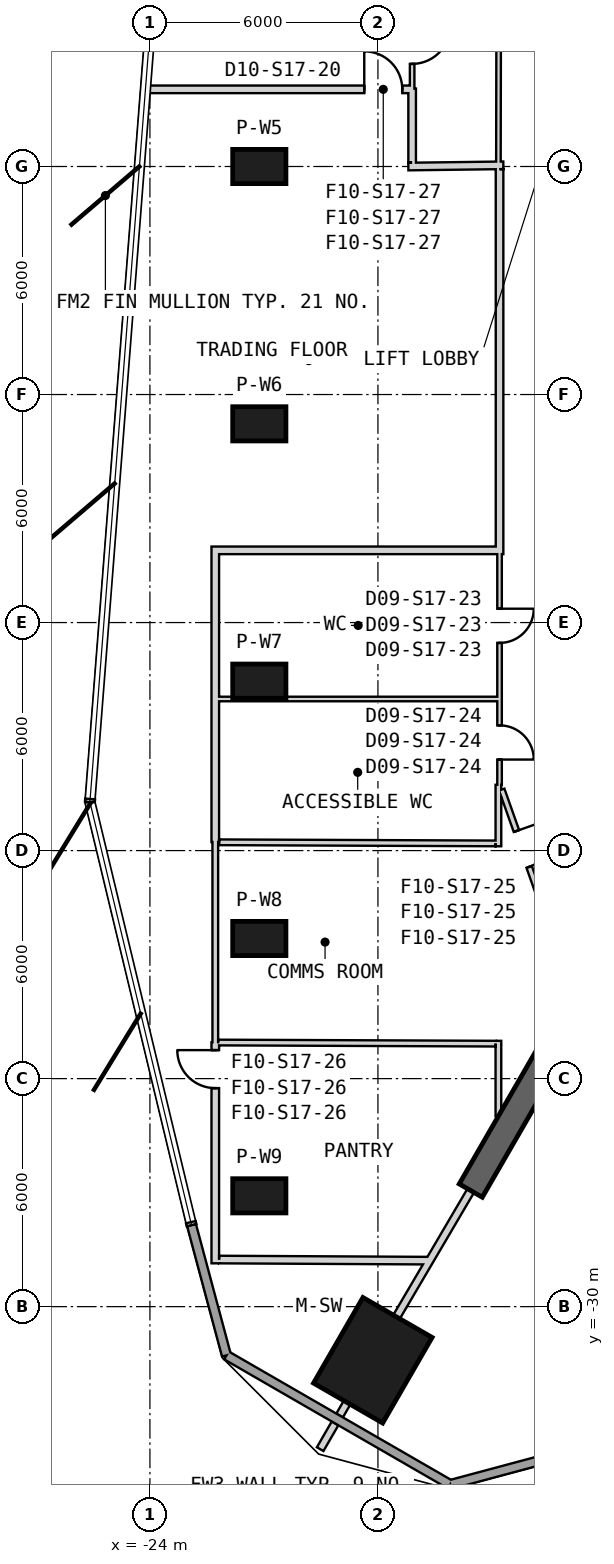
"""IFC4 building model, lengths in metres.
Left out: names, types, materials, properties, quantities, classifications, styles, units other than length and angle.
Written with IfcOpenShell. Run it as: python <this file> out.ifc"""

import sys

from ifc_helpers import new_model, si_unit, direction, frame, frame_2d, origin, origin_2d, place, context, subcontext, project, spatial, rectangle, extrude, element, fill, save


model = new_model("IFC4")
c1 = context("Model", 3, precision=1e-05, world=origin(), true_north=direction((0.0, 1.0)))
c2 = subcontext(c1, "Body", "Model", "MODEL_VIEW")
j1 = project(units=[si_unit("LENGTHUNIT", "METRE"), si_unit("PLANEANGLEUNIT", "RADIAN")], contexts=[c1])
p1 = place(None, origin())
s1 = spatial("IfcSite", under=j1, at=p1, CompositionType="ELEMENT")
p2 = place(p1, origin())
s2 = spatial("IfcBuilding", under=s1, at=p2, CompositionType="ELEMENT")
p3 = place(p2, frame((0.0, 0.0, 265.2)))
s3 = spatial("IfcBuildingStorey", under=s2, at=p3, CompositionType="ELEMENT", Elevation=265.2)
p4 = place(p3, frame((-18.135, -31.411, 0.0), z_axis=(0.0, 0.0, 1.0), x_axis=(-0.5, -0.866025403784, 0.0)))
e1 = element("IfcColumn", 1, at=p4, inside=s3, PredefinedType="COLUMN", context=c2, shape_type="SweptSolid", body=[
    extrude(rectangle(XDim=2.6, YDim=2.1, at=origin_2d()), origin(), (0.0, 0.0, 1.0), 4.0),
])
for number, where, z_axis, x_axis in (
    (2, (-21.121, 0.0, 0.0), (0.0, 0.0, 1.0), (-1.0, 0.0, 0.0)),
    (3, (-21.121, -6.771, 0.0), (0.0, 0.0, 1.0), (-1.0, 0.0, 0.0)),
    (4, (-21.121, -13.542, 0.0), (0.0, 0.0, 1.0), (-1.0, 0.0, 0.0)),
    (5, (-21.121, -20.313, 0.0), (0.0, 0.0, 1.0), (-1.0, 0.0, 0.0)),
    (6, (-21.121, -27.084, 0.0), (0.0, 0.0, 1.0), (-1.0, 0.0, 0.0)),
):
    element("IfcColumn", number, at=place(p3, frame(where, z_axis=z_axis, x_axis=x_axis)), inside=s3, PredefinedType="COLUMN", context=c2, shape_type="SweptSolid", body=[
        extrude(rectangle(XDim=1.4, YDim=0.9, at=origin_2d()), origin(), (0.0, 0.0, 1.0), 4.0),
    ])
p5 = place(p3, frame((-10.575, -18.316, 0.0), z_axis=(0.0, 0.0, 1.0), x_axis=(-0.500007350791, -0.866021159762, 0.0)))
e7 = element("IfcWall", 7, at=p5, inside=s3, PredefinedType="SHEAR", context=c2, shape_type="SweptSolid", body=[
    extrude(rectangle(XDim=9.965, YDim=0.7, at=frame_2d((4.982, 0.0))), origin(), (0.0, 0.0, 1.0), 4.0),
])
p6 = place(p3, frame((-22.905, -27.854, 0.0), z_axis=(0.0, 0.0, 1.0), x_axis=(0.258814010312, -0.965927175343, 0.0)))
e8 = element("IfcWall", 8, at=p6, inside=s3, PredefinedType="SOLIDWALL", context=c2, shape_type="SweptSolid", body=[
    extrude(rectangle(XDim=3.55, YDim=0.24, at=frame_2d((1.775, 0.0))), origin(), (0.0, 0.0, 1.0), 3.7),
])
p7 = place(p3, frame((-21.986, -31.283, 0.0), z_axis=(0.0, 0.0, 1.0), x_axis=(0.866022320763, -0.500005339912, 0.0)))
e9 = element("IfcWall", 9, at=p7, inside=s3, PredefinedType="SOLIDWALL", context=c2, shape_type="SweptSolid", body=[
    extrude(rectangle(XDim=6.798, YDim=0.24, at=frame_2d((3.399, 0.0))), origin(), (0.0, 0.0, 1.0), 3.7),
])
p8 = place(p3, frame((-16.099, -34.682, 0.0), z_axis=(0.0, 0.0, 1.0), x_axis=(0.965919080444, 0.258844219627, 0.0)))
e10 = element("IfcWall", 10, at=p8, inside=s3, PredefinedType="SOLIDWALL", context=c2, shape_type="SweptSolid", body=[
    extrude(rectangle(XDim=3.536, YDim=0.24, at=frame_2d((1.768, 0.0))), origin(), (0.0, 0.0, 1.0), 3.7),
])
p9 = place(p3, frame((-14.8, 16.257, 0.0), z_axis=(0.0, 0.0, 1.0), x_axis=(-0.001847148781, -0.999998294019, 0.0)))
e11 = element("IfcWall", 11, at=p9, inside=s3, PredefinedType="PARTITIONING", context=c2, shape_type="SweptSolid", body=[
    extrude(rectangle(XDim=16.257, YDim=0.12, at=frame_2d((8.128, 0.0))), origin(), (0.0, 0.0, 1.0), 2.98),
])
p10 = place(p9, frame((7.629, 0.0, 0.0)))
e12 = element("IfcOpeningElement", 12, at=p10, cuts=e11, PredefinedType="OPENING", context=c2, shape_type="SweptSolid", body=[
    extrude(rectangle(XDim=1.0, YDim=2.1, at=frame_2d((0.5, 1.05))), frame((0.0, 0.07, 0.0), z_axis=(0.0, -1.0, 0.0), x_axis=(1.0, 0.0, 0.0)), (0.0, 0.0, 1.0), 0.14),
])
p11 = place(p3, frame((-14.8, -10.13, 0.0), z_axis=(0.0, 0.0, 1.0), x_axis=(0.0, -1.0, 0.0)))
e13 = element("IfcWall", 13, at=p11, inside=s3, PredefinedType="PARTITIONING", context=c2, shape_type="SweptSolid", body=[
    extrude(rectangle(XDim=6.138, YDim=0.12, at=frame_2d((3.069, 0.0))), origin(), (0.0, 0.0, 1.0), 2.98),
])
p12 = place(p11, frame((1.506, 0.0, 0.0)))
e14 = element("IfcOpeningElement", 14, at=p12, cuts=e13, PredefinedType="OPENING", context=c2, shape_type="SweptSolid", body=[
    extrude(rectangle(XDim=0.9, YDim=2.1, at=frame_2d((0.45, 1.05))), frame((0.0, 0.07, 0.0), z_axis=(0.0, -1.0, 0.0), x_axis=(1.0, 0.0, 0.0)), (0.0, 0.0, 1.0), 0.14),
])
p13 = place(p11, frame((4.575, 0.0, 0.0)))
e15 = element("IfcOpeningElement", 15, at=p13, cuts=e13, PredefinedType="OPENING", context=c2, shape_type="SweptSolid", body=[
    extrude(rectangle(XDim=0.9, YDim=2.1, at=frame_2d((0.45, 1.05))), frame((0.0, 0.07, 0.0), z_axis=(0.0, -1.0, 0.0), x_axis=(1.0, 0.0, 0.0)), (0.0, 0.0, 1.0), 0.14),
])
p14 = place(p3, frame((-17.1, 4.35, 0.0), z_axis=(0.0, 0.0, 1.0), x_axis=(0.0, -1.0, 0.0)))
e16 = element("IfcWall", 16, at=p14, inside=s3, PredefinedType="PARTITIONING", context=c2, shape_type="SweptSolid", body=[
    extrude(rectangle(XDim=2.3, YDim=0.12, at=frame_2d((1.15, 0.0))), origin(), (0.0, 0.0, 1.0), 3.7),
])
p15 = place(p14, frame((0.65, 0.0, 0.0)))
e17 = element("IfcOpeningElement", 17, at=p15, cuts=e16, PredefinedType="OPENING", context=c2, shape_type="SweptSolid", body=[
    extrude(rectangle(XDim=1.0, YDim=2.1, at=frame_2d((0.5, 1.05))), frame((0.0, 0.07, 0.0), z_axis=(0.0, -1.0, 0.0), x_axis=(1.0, 0.0, 0.0)), (0.0, 0.0, 1.0), 0.14),
])
p16 = place(p3, frame((-17.2, -0.001, 0.0), z_axis=(0.0, 0.0, 1.0), x_axis=(0.999915662945, 0.012987185857, 0.0)))
e18 = element("IfcWall", 18, at=p16, inside=s3, PredefinedType="PARTITIONING", context=c2, shape_type="SweptSolid", body=[
    extrude(rectangle(XDim=2.5, YDim=0.2, at=frame_2d((1.25, 0.0))), origin(), (0.0, 0.0, 1.0), 3.07),
])
p17 = place(p3, frame((-17.1, 2.05, 0.0), z_axis=(0.0, 0.0, 1.0), x_axis=(0.0, -1.0, 0.0)))
e19 = element("IfcWall", 19, at=p17, inside=s3, PredefinedType="PARTITIONING", context=c2, shape_type="SweptSolid", body=[
    extrude(rectangle(XDim=1.95, YDim=0.2, at=frame_2d((0.975, 0.0))), origin(), (0.0, 0.0, 1.0), 3.07),
])
p18 = place(p3, frame((-14.8, -0.07, 0.0), z_axis=(0.0, 0.0, 1.0), x_axis=(0.0, -1.0, 0.0)))
e20 = element("IfcWall", 20, at=p18, inside=s3, PredefinedType="PARTITIONING", context=c2, shape_type="SweptSolid", body=[
    extrude(rectangle(XDim=10.13, YDim=0.2, at=frame_2d((5.065, 0.0))), origin(), (0.0, 0.0, 1.0), 3.07),
])
p19 = place(p3, frame((-14.743, -16.394, 0.0), z_axis=(0.0, 0.0, 1.0), x_axis=(0.334298080075, -0.942467396602, 0.0)))
e21 = element("IfcWall", 21, at=p19, inside=s3, PredefinedType="PLUMBINGWALL", context=c2, shape_type="SweptSolid", body=[
    extrude(rectangle(XDim=3.317, YDim=0.15, at=frame_2d((1.659, 0.0))), origin(), (0.0, 0.0, 1.0), 2.88),
])
p20 = place(p19, frame((1.158, 0.0, 0.0)))
e22 = element("IfcOpeningElement", 22, at=p20, cuts=e21, PredefinedType="OPENING", context=c2, shape_type="SweptSolid", body=[
    extrude(rectangle(XDim=1.0, YDim=2.1, at=frame_2d((0.5, 1.05))), frame((0.0, 0.085, 0.0), z_axis=(0.0, -1.0, 0.0), x_axis=(1.0, 0.0, 0.0)), (0.0, 0.0, 1.0), 0.17),
])
p21 = place(p3, frame((-24.118, 2.03, 0.0), z_axis=(0.0, 0.0, 1.0), x_axis=(1.0, 0.0, 0.0)))
e23 = element("IfcWall", 23, at=p21, inside=s3, PredefinedType="PARTITIONING", context=c2, shape_type="SweptSolid", body=[
    extrude(rectangle(XDim=6.958, YDim=0.2, at=frame_2d((3.479, 0.0))), origin(), (0.0, 0.0, 1.0), 3.7),
])
p22 = place(p21, frame((5.758, 0.0, 0.0)))
e24 = element("IfcOpeningElement", 24, at=p22, cuts=e23, PredefinedType="OPENING", context=c2, shape_type="SweptSolid", body=[
    extrude(rectangle(XDim=1.0, YDim=2.1, at=frame_2d((0.5, 1.05))), frame((0.0, 0.11, 0.0), z_axis=(0.0, -1.0, 0.0), x_axis=(1.0, 0.0, 0.0)), (0.0, 0.0, 1.0), 0.22),
])
p23 = place(p3, frame((-15.557, -26.946, 0.0), z_axis=(0.0, 0.0, 1.0), x_axis=(-0.506699088554, -0.862122980588, 0.0)))
e25 = element("IfcWall", 25, at=p23, inside=s3, PredefinedType="PARTITIONING", context=c2, shape_type="SweptSolid", body=[
    extrude(rectangle(XDim=3.855, YDim=0.2, at=frame_2d((1.928, 0.0))), origin(), (0.0, 0.0, 1.0), 3.27),
])
p24 = place(p3, frame((-18.811, -32.522, 0.0), z_axis=(0.0, 0.0, 1.0), x_axis=(-0.500061319399, -0.865989998118, 0.0)))
e26 = element("IfcWall", 26, at=p24, inside=s3, PredefinedType="PARTITIONING", context=c2, shape_type="SweptSolid", body=[
    extrude(rectangle(XDim=0.395, YDim=0.2, at=frame_2d((0.198, 0.0))), origin(), (0.0, 0.0, 1.0), 3.7),
])
p25 = place(p3, frame((-19.129, -33.072, 0.0), z_axis=(0.0, 0.0, 1.0), x_axis=(-0.499929430274, -0.866066143401, 0.0)))
e27 = element("IfcWall", 27, at=p25, inside=s3, PredefinedType="PARTITIONING", context=c2, shape_type="SweptSolid", body=[
    extrude(rectangle(XDim=0.783, YDim=0.2, at=frame_2d((0.391, 0.0))), origin(), (0.0, 0.0, 1.0), 3.7),
])
p26 = place(p3, frame((-14.9, -10.1, 0.0), z_axis=(0.0, 0.0, 1.0), x_axis=(-1.0, 0.0, 0.0)))
e28 = element("IfcWall", 28, at=p26, inside=s3, PredefinedType="PARTITIONING", context=c2, shape_type="SweptSolid", body=[
    extrude(rectangle(XDim=7.48, YDim=0.2, at=frame_2d((3.74, 0.0))), origin(), (0.0, 0.0, 1.0), 3.07),
])
p27 = place(p3, frame((-22.28, -28.86, 0.0), z_axis=(0.0, 0.0, 1.0), x_axis=(0.0, 1.0, 0.0)))
e29 = element("IfcWall", 29, at=p27, inside=s3, PredefinedType="PARTITIONING", context=c2, shape_type="SweptSolid", body=[
    extrude(rectangle(XDim=5.817, YDim=0.2, at=frame_2d((2.909, 0.0))), origin(), (0.0, 0.0, 1.0), 3.7),
])
p28 = place(p27, frame((4.61, 0.0, 0.0)))
e30 = element("IfcOpeningElement", 30, at=p28, cuts=e29, PredefinedType="OPENING", context=c2, shape_type="SweptSolid", body=[
    extrude(rectangle(XDim=1.0, YDim=2.1, at=frame_2d((0.5, 1.05))), frame((0.0, 0.11, 0.0), z_axis=(0.0, -1.0, 0.0), x_axis=(1.0, 0.0, 0.0)), (0.0, 0.0, 1.0), 0.22),
])
p29 = place(p3, frame((-22.28, -17.774, 0.0), z_axis=(0.0, 0.0, 1.0), x_axis=(0.0, 1.0, 0.0)))
e31 = element("IfcWall", 31, at=p29, inside=s3, PredefinedType="PARTITIONING", context=c2, shape_type="SweptSolid", body=[
    extrude(rectangle(XDim=7.574, YDim=0.2, at=frame_2d((3.787, 0.0))), origin(), (0.0, 0.0, 1.0), 3.7),
])
p30 = place(p3, frame((-22.28, -23.043, 0.0), z_axis=(0.0, 0.0, 1.0), x_axis=(0.0, 1.0, 0.0)))
e32 = element("IfcWall", 32, at=p30, inside=s3, PredefinedType="PLUMBINGWALL", context=c2, shape_type="SweptSolid", body=[
    extrude(rectangle(XDim=5.269, YDim=0.15, at=frame_2d((2.634, 0.0))), origin(), (0.0, 0.0, 1.0), 3.7),
])
p31 = place(p3, frame((-22.18, -28.76, 0.0), z_axis=(0.0, 0.0, 1.0), x_axis=(0.999985875988, -0.005314868268, 0.0)))
e33 = element("IfcWall", 33, at=p31, inside=s3, PredefinedType="PARTITIONING", context=c2, shape_type="SweptSolid", body=[
    extrude(rectangle(XDim=5.558, YDim=0.2, at=frame_2d((2.779, 0.0))), origin(), (0.0, 0.0, 1.0), 3.27),
])
p32 = place(p3, frame((-22.18, -14.011, 0.0), z_axis=(0.0, 0.0, 1.0), x_axis=(1.0, 0.0, 0.0)))
e34 = element("IfcWall", 34, at=p32, inside=s3, PredefinedType="PARTITIONING", context=c2, shape_type="SweptSolid", body=[
    extrude(rectangle(XDim=7.35, YDim=0.12, at=frame_2d((3.675, 0.0))), origin(), (0.0, 0.0, 1.0), 3.7),
])
p33 = place(p3, frame((-14.83, -24.986, 0.0), z_axis=(0.0, 0.0, 1.0), x_axis=(0.0, 1.0, 0.0)))
e35 = element("IfcWall", 35, at=p33, inside=s3, PredefinedType="PLUMBINGWALL", context=c2, shape_type="SweptSolid", body=[
    extrude(rectangle(XDim=1.981, YDim=0.15, at=frame_2d((0.991, 0.0))), origin(), (0.0, 0.0, 1.0), 3.7),
])
p34 = place(p3, frame((-14.83, -17.886, 0.0), z_axis=(0.0, 0.0, 1.0), x_axis=(0.0, 1.0, 0.0)))
e36 = element("IfcWall", 36, at=p34, inside=s3, PredefinedType="PLUMBINGWALL", context=c2, shape_type="SweptSolid", body=[
    extrude(rectangle(XDim=1.618, YDim=0.15, at=frame_2d((0.809, 0.0))), origin(), (0.0, 0.0, 1.0), 3.7),
])
p35 = place(p3, frame((-14.905, -17.811, 0.0), z_axis=(0.0, 0.0, 1.0), x_axis=(-0.999991891267, 0.004027083259, 0.0)))
e37 = element("IfcWall", 37, at=p35, inside=s3, PredefinedType="PLUMBINGWALL", context=c2, shape_type="SweptSolid", body=[
    extrude(rectangle(XDim=7.275, YDim=0.15, at=frame_2d((3.637, 0.0))), origin(), (0.0, 0.0, 1.0), 2.98),
])
p36 = place(p3, frame((-22.205, -23.051, 0.0), z_axis=(0.0, 0.0, 1.0), x_axis=(0.999991947035, -0.004013211386, 0.0)))
e38 = element("IfcWall", 38, at=p36, inside=s3, PredefinedType="PLUMBINGWALL", context=c2, shape_type="SweptSolid", body=[
    extrude(rectangle(XDim=7.3, YDim=0.15, at=frame_2d((3.65, 0.0))), origin(), (0.0, 0.0, 1.0), 2.88),
])
p37 = place(p15, origin())
e39 = element("IfcDoor", 39, at=p37, inside=s3, OperationType="SINGLE_SWING_RIGHT", PredefinedType="NOTDEFINED", context=c2, shape_type="SweptSolid", body=[
    extrude(rectangle(XDim=1.0, YDim=2.1, at=frame_2d((0.5, 1.05))), frame((0.0, 0.025, 0.0), z_axis=(0.0, -1.0, 0.0), x_axis=(1.0, 0.0, 0.0)), (0.0, 0.0, 1.0), 0.05),
])
fill(e17, e39)
p38 = place(p12, origin())
e40 = element("IfcDoor", 40, at=p38, inside=s3, OperationType="SINGLE_SWING_RIGHT", PredefinedType="NOTDEFINED", context=c2, shape_type="SweptSolid", body=[
    extrude(rectangle(XDim=0.9, YDim=2.1, at=frame_2d((0.45, 1.05))), frame((0.0, 0.025, 0.0), z_axis=(0.0, -1.0, 0.0), x_axis=(1.0, 0.0, 0.0)), (0.0, 0.0, 1.0), 0.05),
])
fill(e14, e40)
p39 = place(p13, origin())
e41 = element("IfcDoor", 41, at=p39, inside=s3, OperationType="SINGLE_SWING_RIGHT", PredefinedType="NOTDEFINED", context=c2, shape_type="SweptSolid", body=[
    extrude(rectangle(XDim=0.9, YDim=2.1, at=frame_2d((0.45, 1.05))), frame((0.0, 0.025, 0.0), z_axis=(0.0, -1.0, 0.0), x_axis=(1.0, 0.0, 0.0)), (0.0, 0.0, 1.0), 0.05),
])
fill(e15, e41)
p40 = place(p20, origin())
e42 = element("IfcDoor", 42, at=p40, inside=s3, OperationType="SINGLE_SWING_LEFT", PredefinedType="USERDEFINED", context=c2, shape_type="SweptSolid", body=[
    extrude(rectangle(XDim=1.0, YDim=2.1, at=frame_2d((0.5, 1.05))), frame((0.0, 0.025, 0.0), z_axis=(0.0, -1.0, 0.0), x_axis=(1.0, 0.0, 0.0)), (0.0, 0.0, 1.0), 0.05),
])
fill(e22, e42)
p41 = place(p28, origin())
e43 = element("IfcDoor", 43, at=p41, inside=s3, OperationType="SINGLE_SWING_RIGHT", PredefinedType="USERDEFINED", context=c2, shape_type="SweptSolid", body=[
    extrude(rectangle(XDim=1.0, YDim=2.1, at=frame_2d((0.5, 1.05))), frame((0.0, 0.025, 0.0), z_axis=(0.0, -1.0, 0.0), x_axis=(1.0, 0.0, 0.0)), (0.0, 0.0, 1.0), 0.05),
])
fill(e30, e43)
p42 = place(p22, origin())
e44 = element("IfcDoor", 44, at=p42, inside=s3, OperationType="SINGLE_SWING_RIGHT", PredefinedType="USERDEFINED", context=c2, shape_type="SweptSolid", body=[
    extrude(rectangle(XDim=1.0, YDim=2.1, at=frame_2d((0.5, 1.05))), frame((0.0, 0.025, 0.0), z_axis=(0.0, -1.0, 0.0), x_axis=(1.0, 0.0, 0.0)), (0.0, 0.0, 1.0), 0.05),
])
fill(e24, e44)
save(model, sys.argv[1])
